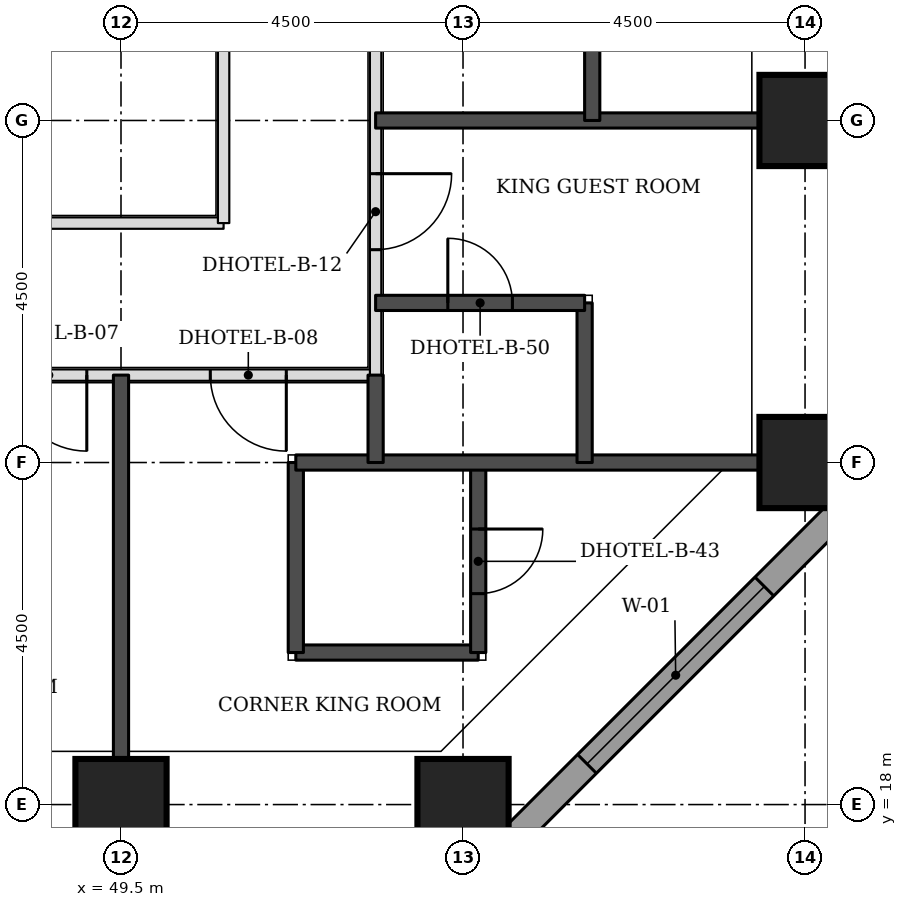
"""IFC4 building model, lengths in metres.
Left out: names, types, materials, properties, quantities, classifications, styles, units other than length and angle.
Written with IfcOpenShell. Run it as: python <this file> out.ifc"""

import sys

from ifc_helpers import new_model, si_unit, direction, frame, frame_2d, origin, origin_2d, place, context, subcontext, project, spatial, rectangle, extrude, element, fill, save


model = new_model("IFC4")
c1 = context("Model", 3, precision=1e-05, world=origin(), true_north=direction((0.0, 1.0)))
c2 = subcontext(c1, "Body", "Model", "MODEL_VIEW")
j1 = project(units=[si_unit("LENGTHUNIT", "METRE"), si_unit("PLANEANGLEUNIT", "RADIAN")], contexts=[c1])
p1 = place(None, origin())
s1 = spatial("IfcSite", under=j1, at=p1, CompositionType="ELEMENT")
p2 = place(p1, origin())
s2 = spatial("IfcBuilding", under=s1, at=p2, CompositionType="ELEMENT")
p3 = place(p2, frame((0.0, 0.0, 52.8)))
s3 = spatial("IfcBuildingStorey", under=s2, at=p3, CompositionType="ELEMENT", Elevation=52.8)
for number, where, z_axis, x_axis in (
    (1, (49.5, 18.0, 0.0), (0.0, 0.0, 1.0), (1.0, 0.0, 0.0)),
    (2, (54.0, 18.0, 0.0), (0.0, 0.0, 1.0), (1.0, 0.0, 0.0)),
    (3, (58.5, 22.5, 0.0), (0.0, 0.0, 1.0), (1.0, 0.0, 0.0)),
    (4, (58.5, 27.0, 0.0), (0.0, 0.0, 1.0), (1.0, 0.0, 0.0)),
):
    element("IfcColumn", number, at=place(p3, frame(where, z_axis=z_axis, x_axis=x_axis)), inside=s3, PredefinedType="COLUMN", context=c2, shape_type="SweptSolid", body=[
        extrude(rectangle(XDim=1.2, YDim=1.2, at=origin_2d()), origin(), (0.0, 0.0, 1.0), 3.3),
    ])
p4 = place(p3, frame((54.27, 17.174, 0.0), z_axis=(0.0, 0.0, 1.0), x_axis=(0.707106781187, 0.707106781187, 0.0)))
e5 = element("IfcWall", 5, at=p4, inside=s3, PredefinedType="STANDARD", context=c2, shape_type="SweptSolid", body=[
    extrude(rectangle(XDim=7.151, YDim=0.35, at=frame_2d((3.576, 0.0))), origin(), (0.0, 0.0, 1.0), 3.055),
])
p5 = place(p4, frame((1.926, 0.0, 0.8)))
e6 = element("IfcOpeningElement", 6, at=p5, cuts=e5, PredefinedType="OPENING", context=c2, shape_type="SweptSolid", body=[
    extrude(rectangle(XDim=3.3, YDim=1.5, at=frame_2d((1.65, 0.75))), frame((0.0, 0.185, 0.0), z_axis=(0.0, -1.0, 0.0), x_axis=(1.0, 0.0, 0.0)), (0.0, 0.0, 1.0), 0.37),
])
p6 = place(p3, frame((20.65, 23.65, 0.0), z_axis=(0.0, 0.0, 1.0), x_axis=(1.0, 0.0, 0.0)))
e7 = element("IfcWall", 7, at=p6, inside=s3, PredefinedType="PARTITIONING", context=c2, shape_type="SweptSolid", body=[
    extrude(rectangle(XDim=32.2, YDim=0.15, at=frame_2d((16.1, 0.0))), origin(), (0.0, 0.0, 1.0), 3.08),
])
p7 = place(p6, frame((2.55, 0.0, 0.0)))
e8 = element("IfcOpeningElement", 8, at=p7, cuts=e7, PredefinedType="OPENING", context=c2, shape_type="SweptSolid", body=[
    extrude(rectangle(XDim=1.0, YDim=2.1, at=frame_2d((0.5, 1.05))), frame((0.0, 0.085, 0.0), z_axis=(0.0, -1.0, 0.0), x_axis=(1.0, 0.0, 0.0)), (0.0, 0.0, 1.0), 0.17),
])
p8 = place(p6, frame((9.4, 0.0, 0.0)))
e9 = element("IfcOpeningElement", 9, at=p8, cuts=e7, PredefinedType="OPENING", context=c2, shape_type="SweptSolid", body=[
    extrude(rectangle(XDim=1.0, YDim=2.1, at=frame_2d((0.5, 1.05))), frame((0.0, 0.085, 0.0), z_axis=(0.0, -1.0, 0.0), x_axis=(1.0, 0.0, 0.0)), (0.0, 0.0, 1.0), 0.17),
])
p9 = place(p6, frame((11.55, 0.0, 0.0)))
e10 = element("IfcOpeningElement", 10, at=p9, cuts=e7, PredefinedType="OPENING", context=c2, shape_type="SweptSolid", body=[
    extrude(rectangle(XDim=1.0, YDim=2.1, at=frame_2d((0.5, 1.05))), frame((0.0, 0.085, 0.0), z_axis=(0.0, -1.0, 0.0), x_axis=(1.0, 0.0, 0.0)), (0.0, 0.0, 1.0), 0.17),
])
p10 = place(p6, frame((18.4, 0.0, 0.0)))
e11 = element("IfcOpeningElement", 11, at=p10, cuts=e7, PredefinedType="OPENING", context=c2, shape_type="SweptSolid", body=[
    extrude(rectangle(XDim=1.0, YDim=2.1, at=frame_2d((0.5, 1.05))), frame((0.0, 0.085, 0.0), z_axis=(0.0, -1.0, 0.0), x_axis=(1.0, 0.0, 0.0)), (0.0, 0.0, 1.0), 0.17),
])
p11 = place(p6, frame((20.55, 0.0, 0.0)))
e12 = element("IfcOpeningElement", 12, at=p11, cuts=e7, PredefinedType="OPENING", context=c2, shape_type="SweptSolid", body=[
    extrude(rectangle(XDim=1.0, YDim=2.1, at=frame_2d((0.5, 1.05))), frame((0.0, 0.085, 0.0), z_axis=(0.0, -1.0, 0.0), x_axis=(1.0, 0.0, 0.0)), (0.0, 0.0, 1.0), 0.17),
])
p12 = place(p6, frame((27.4, 0.0, 0.0)))
e13 = element("IfcOpeningElement", 13, at=p12, cuts=e7, PredefinedType="OPENING", context=c2, shape_type="SweptSolid", body=[
    extrude(rectangle(XDim=1.0, YDim=2.1, at=frame_2d((0.5, 1.05))), frame((0.0, 0.085, 0.0), z_axis=(0.0, -1.0, 0.0), x_axis=(1.0, 0.0, 0.0)), (0.0, 0.0, 1.0), 0.17),
])
p13 = place(p6, frame((0.425, 0.0, 0.0)))
e14 = element("IfcOpeningElement", 14, at=p13, cuts=e7, PredefinedType="OPENING", context=c2, shape_type="SweptSolid", body=[
    extrude(rectangle(XDim=1.0, YDim=2.1, at=frame_2d((0.5, 1.05))), frame((0.0, 0.085, 0.0), z_axis=(0.0, -1.0, 0.0), x_axis=(1.0, 0.0, 0.0)), (0.0, 0.0, 1.0), 0.17),
])
p14 = place(p6, frame((30.025, 0.0, 0.0)))
e15 = element("IfcOpeningElement", 15, at=p14, cuts=e7, PredefinedType="OPENING", context=c2, shape_type="SweptSolid", body=[
    extrude(rectangle(XDim=1.0, YDim=2.1, at=frame_2d((0.5, 1.05))), frame((0.0, 0.085, 0.0), z_axis=(0.0, -1.0, 0.0), x_axis=(1.0, 0.0, 0.0)), (0.0, 0.0, 1.0), 0.17),
])
p15 = place(p3, frame((52.85, 23.65, 0.0), z_axis=(0.0, 0.0, 1.0), x_axis=(0.0, 1.0, 0.0)))
e16 = element("IfcWall", 16, at=p15, inside=s3, PredefinedType="PARTITIONING", context=c2, shape_type="SweptSolid", body=[
    extrude(rectangle(XDim=23.85, YDim=0.15, at=frame_2d((11.925, 0.0))), origin(), (0.0, 0.0, 1.0), 3.08),
])
p16 = place(p15, frame((1.65, 0.0, 0.0)))
e17 = element("IfcOpeningElement", 17, at=p16, cuts=e16, PredefinedType="OPENING", context=c2, shape_type="SweptSolid", body=[
    extrude(rectangle(XDim=1.0, YDim=2.1, at=frame_2d((0.5, 1.05))), frame((0.0, 0.085, 0.0), z_axis=(0.0, -1.0, 0.0), x_axis=(1.0, 0.0, 0.0)), (0.0, 0.0, 1.0), 0.17),
])
p17 = place(p15, frame((8.95, 0.0, 0.0)))
e18 = element("IfcOpeningElement", 18, at=p17, cuts=e16, PredefinedType="OPENING", context=c2, shape_type="SweptSolid", body=[
    extrude(rectangle(XDim=1.0, YDim=2.1, at=frame_2d((0.5, 1.05))), frame((0.0, 0.085, 0.0), z_axis=(0.0, -1.0, 0.0), x_axis=(1.0, 0.0, 0.0)), (0.0, 0.0, 1.0), 0.17),
])
p18 = place(p15, frame((13.05, 0.0, 0.0)))
e19 = element("IfcOpeningElement", 19, at=p18, cuts=e16, PredefinedType="OPENING", context=c2, shape_type="SweptSolid", body=[
    extrude(rectangle(XDim=1.0, YDim=2.1, at=frame_2d((0.5, 1.05))), frame((0.0, 0.085, 0.0), z_axis=(0.0, -1.0, 0.0), x_axis=(1.0, 0.0, 0.0)), (0.0, 0.0, 1.0), 0.17),
])
p19 = place(p15, frame((19.9, 0.0, 0.0)))
e20 = element("IfcOpeningElement", 20, at=p19, cuts=e16, PredefinedType="OPENING", context=c2, shape_type="SweptSolid", body=[
    extrude(rectangle(XDim=0.9, YDim=2.1, at=frame_2d((0.45, 1.05))), frame((0.0, 0.085, 0.0), z_axis=(0.0, -1.0, 0.0), x_axis=(1.0, 0.0, 0.0)), (0.0, 0.0, 1.0), 0.17),
])
p20 = place(p3, frame((40.5, 25.65, 0.0), z_axis=(0.0, 0.0, 1.0), x_axis=(1.0, 0.0, 0.0)))
e21 = element("IfcWall", 21, at=p20, inside=s3, PredefinedType="PARTITIONING", context=c2, shape_type="SweptSolid", body=[
    extrude(rectangle(XDim=10.35, YDim=0.15, at=frame_2d((5.175, 0.0))), origin(), (0.0, 0.0, 1.0), 3.08),
])
p21 = place(p3, frame((50.85, 25.65, 0.0), z_axis=(0.0, 0.0, 1.0), x_axis=(0.0, 1.0, 0.0)))
e22 = element("IfcWall", 22, at=p21, inside=s3, PredefinedType="PARTITIONING", context=c2, shape_type="SweptSolid", body=[
    extrude(rectangle(XDim=3.85, YDim=0.15, at=frame_2d((1.925, 0.0))), origin(), (0.0, 0.0, 1.0), 3.08),
])
p22 = place(p3, frame((49.5, 18.6, 0.0), z_axis=(0.0, 0.0, 1.0), x_axis=(0.0, 1.0, 0.0)))
e23 = element("IfcWall", 23, at=p22, inside=s3, PredefinedType="SOLIDWALL", context=c2, shape_type="SweptSolid", body=[
    extrude(rectangle(XDim=5.05, YDim=0.2, at=frame_2d((2.525, 0.0))), origin(), (0.0, 0.0, 1.0), 3.08),
])
p23 = place(p3, frame((51.8, 20.0, 0.0), z_axis=(0.0, 0.0, 1.0), x_axis=(1.0, 0.0, 0.0)))
e24 = element("IfcWall", 24, at=p23, inside=s3, PredefinedType="SOLIDWALL", context=c2, shape_type="SweptSolid", body=[
    extrude(rectangle(XDim=2.4, YDim=0.2, at=frame_2d((1.2, 0.0))), origin(), (0.0, 0.0, 1.0), 3.08),
])
p24 = place(p3, frame((51.8, 20.0, 0.0), z_axis=(0.0, 0.0, 1.0), x_axis=(0.0, 1.0, 0.0)))
e25 = element("IfcWall", 25, at=p24, inside=s3, PredefinedType="SOLIDWALL", context=c2, shape_type="SweptSolid", body=[
    extrude(rectangle(XDim=2.5, YDim=0.2, at=frame_2d((1.25, 0.0))), origin(), (0.0, 0.0, 1.0), 3.08),
])
p25 = place(p3, frame((54.2, 20.0, 0.0), z_axis=(0.0, 0.0, 1.0), x_axis=(0.0, 1.0, 0.0)))
e26 = element("IfcWall", 26, at=p25, inside=s3, PredefinedType="SOLIDWALL", context=c2, shape_type="SweptSolid", body=[
    extrude(rectangle(XDim=2.5, YDim=0.2, at=frame_2d((1.25, 0.0))), origin(), (0.0, 0.0, 1.0), 3.08),
])
p26 = place(p25, frame((0.775, 0.0, 0.0)))
e27 = element("IfcOpeningElement", 27, at=p26, cuts=e26, PredefinedType="OPENING", context=c2, shape_type="SweptSolid", body=[
    extrude(rectangle(XDim=0.85, YDim=2.1, at=frame_2d((0.425, 1.05))), frame((0.0, 0.11, 0.0), z_axis=(0.0, -1.0, 0.0), x_axis=(1.0, 0.0, 0.0)), (0.0, 0.0, 1.0), 0.22),
])
p27 = place(p3, frame((51.8, 22.5, 0.0), z_axis=(0.0, 0.0, 1.0), x_axis=(1.0, 0.0, 0.0)))
e28 = element("IfcWall", 28, at=p27, inside=s3, PredefinedType="SOLIDWALL", context=c2, shape_type="SweptSolid", body=[
    extrude(rectangle(XDim=6.1, YDim=0.2, at=frame_2d((3.05, 0.0))), origin(), (0.0, 0.0, 1.0), 3.08),
])
p28 = place(p3, frame((52.85, 22.5, 0.0), z_axis=(0.0, 0.0, 1.0), x_axis=(0.0, 1.0, 0.0)))
e29 = element("IfcWall", 29, at=p28, inside=s3, PredefinedType="SOLIDWALL", context=c2, shape_type="SweptSolid", body=[
    extrude(rectangle(XDim=1.15, YDim=0.2, at=frame_2d((0.575, 0.0))), origin(), (0.0, 0.0, 1.0), 3.08),
])
p29 = place(p3, frame((55.6, 22.5, 0.0), z_axis=(0.0, 0.0, 1.0), x_axis=(0.0, 1.0, 0.0)))
e30 = element("IfcWall", 30, at=p29, inside=s3, PredefinedType="SOLIDWALL", context=c2, shape_type="SweptSolid", body=[
    extrude(rectangle(XDim=2.1, YDim=0.2, at=frame_2d((1.05, 0.0))), origin(), (0.0, 0.0, 1.0), 3.08),
])
p30 = place(p3, frame((52.85, 24.6, 0.0), z_axis=(0.0, 0.0, 1.0), x_axis=(1.0, 0.0, 0.0)))
e31 = element("IfcWall", 31, at=p30, inside=s3, PredefinedType="SOLIDWALL", context=c2, shape_type="SweptSolid", body=[
    extrude(rectangle(XDim=2.75, YDim=0.2, at=frame_2d((1.375, 0.0))), origin(), (0.0, 0.0, 1.0), 3.08),
])
p31 = place(p30, frame((0.95, 0.0, 0.0)))
e32 = element("IfcOpeningElement", 32, at=p31, cuts=e31, PredefinedType="OPENING", context=c2, shape_type="SweptSolid", body=[
    extrude(rectangle(XDim=0.85, YDim=2.1, at=frame_2d((0.425, 1.05))), frame((0.0, 0.11, 0.0), z_axis=(0.0, -1.0, 0.0), x_axis=(1.0, 0.0, 0.0)), (0.0, 0.0, 1.0), 0.22),
])
p32 = place(p3, frame((52.85, 27.0, 0.0), z_axis=(0.0, 0.0, 1.0), x_axis=(1.0, 0.0, 0.0)))
e33 = element("IfcWall", 33, at=p32, inside=s3, PredefinedType="SOLIDWALL", context=c2, shape_type="SweptSolid", body=[
    extrude(rectangle(XDim=5.05, YDim=0.2, at=frame_2d((2.525, 0.0))), origin(), (0.0, 0.0, 1.0), 3.08),
])
p33 = place(p3, frame((55.7, 27.0, 0.0), z_axis=(0.0, 0.0, 1.0), x_axis=(0.0, 1.0, 0.0)))
e34 = element("IfcWall", 34, at=p33, inside=s3, PredefinedType="SOLIDWALL", context=c2, shape_type="SweptSolid", body=[
    extrude(rectangle(XDim=3.2, YDim=0.2, at=frame_2d((1.6, 0.0))), origin(), (0.0, 0.0, 1.0), 3.08),
])
p34 = place(p5, origin())
e35 = element("IfcWindow", 35, at=p34, inside=s3, PartitioningType="SINGLE_PANEL", PredefinedType="WINDOW", context=c2, shape_type="SweptSolid", body=[
    extrude(rectangle(XDim=3.3, YDim=1.5, at=frame_2d((1.65, 0.75))), frame((0.0, 0.085, 0.0), z_axis=(0.0, -1.0, 0.0), x_axis=(1.0, 0.0, 0.0)), (0.0, 0.0, 1.0), 0.06),
])
fill(e6, e35)
p35 = place(p12, frame((1.0, 0.0, 0.0), z_axis=(0.0, 0.0, 1.0), x_axis=(-1.0, 0.0, 0.0)))
e36 = element("IfcDoor", 36, at=p35, inside=s3, OperationType="SINGLE_SWING_LEFT", PredefinedType="DOOR", context=c2, shape_type="SweptSolid", body=[
    extrude(rectangle(XDim=1.0, YDim=2.1, at=frame_2d((0.5, 1.05))), frame((0.0, 0.025, 0.0), z_axis=(0.0, -1.0, 0.0), x_axis=(1.0, 0.0, 0.0)), (0.0, 0.0, 1.0), 0.05),
])
fill(e13, e36)
p36 = place(p16, frame((1.0, 0.0, 0.0), z_axis=(0.0, 0.0, 1.0), x_axis=(-1.0, 0.0, 0.0)))
e37 = element("IfcDoor", 37, at=p36, inside=s3, OperationType="SINGLE_SWING_LEFT", PredefinedType="DOOR", context=c2, shape_type="SweptSolid", body=[
    extrude(rectangle(XDim=1.0, YDim=2.1, at=frame_2d((0.5, 1.05))), frame((0.0, 0.025, 0.0), z_axis=(0.0, -1.0, 0.0), x_axis=(1.0, 0.0, 0.0)), (0.0, 0.0, 1.0), 0.05),
])
fill(e17, e37)
p37 = place(p31, origin())
e38 = element("IfcDoor", 38, at=p37, inside=s3, OperationType="SINGLE_SWING_LEFT", PredefinedType="DOOR", context=c2, shape_type="SweptSolid", body=[
    extrude(rectangle(XDim=0.85, YDim=2.1, at=frame_2d((0.425, 1.05))), frame((0.0, 0.025, 0.0), z_axis=(0.0, -1.0, 0.0), x_axis=(1.0, 0.0, 0.0)), (0.0, 0.0, 1.0), 0.05),
])
fill(e32, e38)
p38 = place(p14, frame((1.0, 0.0, 0.0), z_axis=(0.0, 0.0, 1.0), x_axis=(-1.0, 0.0, 0.0)))
e39 = element("IfcDoor", 39, at=p38, inside=s3, OperationType="SINGLE_SWING_LEFT", PredefinedType="DOOR", context=c2, shape_type="SweptSolid", body=[
    extrude(rectangle(XDim=1.0, YDim=2.1, at=frame_2d((0.5, 1.05))), frame((0.0, 0.025, 0.0), z_axis=(0.0, -1.0, 0.0), x_axis=(1.0, 0.0, 0.0)), (0.0, 0.0, 1.0), 0.05),
])
fill(e15, e39)
p39 = place(p26, frame((0.85, 0.0, 0.0), z_axis=(0.0, 0.0, 1.0), x_axis=(-1.0, 0.0, 0.0)))
e40 = element("IfcDoor", 40, at=p39, inside=s3, OperationType="SINGLE_SWING_LEFT", PredefinedType="DOOR", context=c2, shape_type="SweptSolid", body=[
    extrude(rectangle(XDim=0.85, YDim=2.1, at=frame_2d((0.425, 1.05))), frame((0.0, 0.025, 0.0), z_axis=(0.0, -1.0, 0.0), x_axis=(1.0, 0.0, 0.0)), (0.0, 0.0, 1.0), 0.05),
])
fill(e27, e40)
save(model, sys.argv[1])
